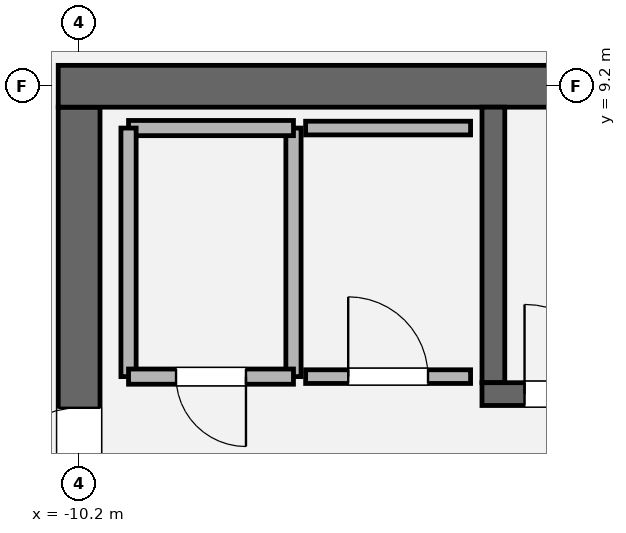
"""IFC4 building model, lengths in metres.
Left out: names, types, materials, properties, quantities, classifications, styles, units other than length and angle.
Written with IfcOpenShell. Run it as: python <this file> out.ifc"""

import sys

from ifc_helpers import new_model, si_unit, direction, frame, frame_2d, origin, place, context, subcontext, project, spatial, rectangle, extrude, element, fill, save


model = new_model("IFC4")
c1 = context("Model", 3, precision=1e-05, world=origin(), true_north=direction((0.0, 1.0)))
c2 = subcontext(c1, "Body", "Model", "MODEL_VIEW")
j1 = project(units=[si_unit("LENGTHUNIT", "METRE"), si_unit("PLANEANGLEUNIT", "RADIAN")], contexts=[c1])
p1 = place(None, origin())
s1 = spatial("IfcSite", under=j1, at=p1, CompositionType="ELEMENT")
p2 = place(p1, origin())
s2 = spatial("IfcBuilding", under=s1, at=p2, CompositionType="ELEMENT")
p3 = place(p2, frame((0.0, 0.0, 313.2)))
s3 = spatial("IfcBuildingStorey", under=s2, at=p3, CompositionType="ELEMENT", Elevation=313.2)
p4 = place(p3, frame((-10.2, -8.925, 0.0), z_axis=(0.0, 0.0, 1.0), x_axis=(0.0, 1.0, 0.0)))
e1 = element("IfcWall", 1, at=p4, inside=s3, PredefinedType="SHEAR", context=c2, shape_type="SweptSolid", body=[
    extrude(rectangle(XDim=17.85, YDim=0.55, at=frame_2d((8.925, 0.0))), origin(), (0.0, 0.0, 1.0), 4.2),
])
p5 = place(p4, frame((12.715, 0.0, 0.0)))
e2 = element("IfcOpeningElement", 2, at=p5, cuts=e1, PredefinedType="OPENING", context=c2, shape_type="SweptSolid", body=[
    extrude(rectangle(XDim=1.18, YDim=2.2, at=frame_2d((0.59, 1.1))), frame((0.0, 0.285, 0.0), z_axis=(0.0, -1.0, 0.0), x_axis=(1.0, 0.0, 0.0)), (0.0, 0.0, 1.0), 0.57),
])
p6 = place(p3, frame((-10.475, 9.2, 0.0), z_axis=(0.0, 0.0, 1.0), x_axis=(1.0, 0.0, 0.0)))
e3 = element("IfcWall", 3, at=p6, inside=s3, PredefinedType="SHEAR", context=c2, shape_type="SweptSolid", body=[
    extrude(rectangle(XDim=20.95, YDim=0.55, at=frame_2d((10.475, 0.0))), origin(), (0.0, 0.0, 1.0), 4.2),
])
p7 = place(p3, frame((-4.75, 5.3, 0.0), z_axis=(0.0, 0.0, 1.0), x_axis=(0.0, 1.0, 0.0)))
e4 = element("IfcWall", 4, at=p7, inside=s3, PredefinedType="SOLIDWALL", context=c2, shape_type="SweptSolid", body=[
    extrude(rectangle(XDim=3.625, YDim=0.3, at=frame_2d((1.812, 0.0))), origin(), (0.0, 0.0, 1.0), 4.2),
])
p8 = place(p3, frame((-4.9, 5.15, 0.0), z_axis=(0.0, 0.0, 1.0), x_axis=(1.0, 0.0, 0.0)))
e5 = element("IfcWall", 5, at=p8, inside=s3, PredefinedType="SOLIDWALL", context=c2, shape_type="SweptSolid", body=[
    extrude(rectangle(XDim=9.8, YDim=0.3, at=frame_2d((4.9, 0.0))), origin(), (0.0, 0.0, 1.0), 4.2),
])
p9 = place(p8, frame((0.56, 0.0, 0.0)))
e6 = element("IfcOpeningElement", 6, at=p9, cuts=e5, PredefinedType="OPENING", context=c2, shape_type="SweptSolid", body=[
    extrude(rectangle(XDim=1.18, YDim=2.2, at=frame_2d((0.59, 1.1))), frame((0.0, 0.16, 0.0), z_axis=(0.0, -1.0, 0.0), x_axis=(1.0, 0.0, 0.0)), (0.0, 0.0, 1.0), 0.32),
])
p10 = place(p3, frame((-7.38, 5.38, 0.0), z_axis=(0.0, 0.0, 1.0), x_axis=(0.0, 1.0, 0.0)))
e7 = element("IfcWall", 7, at=p10, inside=s3, PredefinedType="SOLIDWALL", context=c2, shape_type="SweptSolid", body=[
    extrude(rectangle(XDim=3.27, YDim=0.2, at=frame_2d((1.635, 0.0))), origin(), (0.0, 0.0, 1.0), 3.92),
])
p11 = place(p3, frame((-7.38, 8.65, 0.0), z_axis=(0.0, 0.0, 1.0), x_axis=(-1.0, 0.0, 0.0)))
e8 = element("IfcWall", 8, at=p11, inside=s3, PredefinedType="SOLIDWALL", context=c2, shape_type="SweptSolid", body=[
    extrude(rectangle(XDim=2.17, YDim=0.2, at=frame_2d((1.085, 0.0))), origin(), (0.0, 0.0, 1.0), 3.92),
])
p12 = place(p3, frame((-9.55, 8.65, 0.0), z_axis=(0.0, 0.0, 1.0), x_axis=(0.0, -1.0, 0.0)))
e9 = element("IfcWall", 9, at=p12, inside=s3, PredefinedType="SOLIDWALL", context=c2, shape_type="SweptSolid", body=[
    extrude(rectangle(XDim=3.27, YDim=0.2, at=frame_2d((1.635, 0.0))), origin(), (0.0, 0.0, 1.0), 3.92),
])
p13 = place(p3, frame((-9.55, 5.38, 0.0), z_axis=(0.0, 0.0, 1.0), x_axis=(1.0, 0.0, 0.0)))
e10 = element("IfcWall", 10, at=p13, inside=s3, PredefinedType="SOLIDWALL", context=c2, shape_type="SweptSolid", body=[
    extrude(rectangle(XDim=2.17, YDim=0.2, at=frame_2d((1.085, 0.0))), origin(), (0.0, 0.0, 1.0), 3.92),
])
p14 = place(p13, frame((0.625, 0.0, 0.0)))
e11 = element("IfcOpeningElement", 11, at=p14, cuts=e10, PredefinedType="OPENING", context=c2, shape_type="SweptSolid", body=[
    extrude(rectangle(XDim=0.92, YDim=2.1, at=frame_2d((0.46, 1.05))), frame((0.0, 0.11, 0.0), z_axis=(0.0, -1.0, 0.0), x_axis=(1.0, 0.0, 0.0)), (0.0, 0.0, 1.0), 0.22),
])
p15 = place(p3, frame((-5.05, 8.65, 0.0), z_axis=(0.0, 0.0, 1.0), x_axis=(-1.0, 0.0, 0.0)))
e12 = element("IfcWall", 12, at=p15, inside=s3, PredefinedType="PARTITIONING", context=c2, shape_type="SweptSolid", body=[
    extrude(rectangle(XDim=2.17, YDim=0.18, at=frame_2d((1.085, 0.0))), origin(), (0.0, 0.0, 1.0), 3.92),
])
p16 = place(p3, frame((-7.22, 5.38, 0.0), z_axis=(0.0, 0.0, 1.0), x_axis=(1.0, 0.0, 0.0)))
e13 = element("IfcWall", 13, at=p16, inside=s3, PredefinedType="PARTITIONING", context=c2, shape_type="SweptSolid", body=[
    extrude(rectangle(XDim=2.17, YDim=0.18, at=frame_2d((1.085, 0.0))), origin(), (0.0, 0.0, 1.0), 3.92),
])
p17 = place(p16, frame((0.56, 0.0, 0.0)))
e14 = element("IfcOpeningElement", 14, at=p17, cuts=e13, PredefinedType="OPENING", context=c2, shape_type="SweptSolid", body=[
    extrude(rectangle(XDim=1.05, YDim=2.2, at=frame_2d((0.525, 1.1))), frame((0.0, 0.1, 0.0), z_axis=(0.0, -1.0, 0.0), x_axis=(1.0, 0.0, 0.0)), (0.0, 0.0, 1.0), 0.2),
])
p18 = place(p9, origin())
e15 = element("IfcDoor", 15, at=p18, inside=s3, OperationType="SINGLE_SWING_LEFT", PredefinedType="DOOR", context=c2, shape_type="SweptSolid", body=[
    extrude(rectangle(XDim=1.18, YDim=2.2, at=frame_2d((0.59, 1.1))), frame((0.0, 0.025, 0.0), z_axis=(0.0, -1.0, 0.0), x_axis=(1.0, 0.0, 0.0)), (0.0, 0.0, 1.0), 0.05),
])
fill(e6, e15)
p19 = place(p5, origin())
e16 = element("IfcDoor", 16, at=p19, inside=s3, OperationType="SINGLE_SWING_LEFT", PredefinedType="DOOR", context=c2, shape_type="SweptSolid", body=[
    extrude(rectangle(XDim=1.18, YDim=2.2, at=frame_2d((0.59, 1.1))), frame((0.0, 0.025, 0.0), z_axis=(0.0, -1.0, 0.0), x_axis=(1.0, 0.0, 0.0)), (0.0, 0.0, 1.0), 0.05),
])
fill(e2, e16)
p20 = place(p14, origin())
e17 = element("IfcDoor", 17, at=p20, inside=s3, OperationType="SINGLE_SWING_RIGHT", PredefinedType="DOOR", context=c2, shape_type="SweptSolid", body=[
    extrude(rectangle(XDim=0.92, YDim=2.1, at=frame_2d((0.46, 1.05))), frame((0.0, 0.025, 0.0), z_axis=(0.0, -1.0, 0.0), x_axis=(1.0, 0.0, 0.0)), (0.0, 0.0, 1.0), 0.05),
])
fill(e11, e17)
p21 = place(p17, origin())
e18 = element("IfcDoor", 18, at=p21, inside=s3, OperationType="SINGLE_SWING_LEFT", PredefinedType="DOOR", context=c2, shape_type="SweptSolid", body=[
    extrude(rectangle(XDim=1.05, YDim=2.2, at=frame_2d((0.525, 1.1))), frame((0.0, 0.025, 0.0), z_axis=(0.0, -1.0, 0.0), x_axis=(1.0, 0.0, 0.0)), (0.0, 0.0, 1.0), 0.05),
])
fill(e14, e18)
save(model, sys.argv[1])
